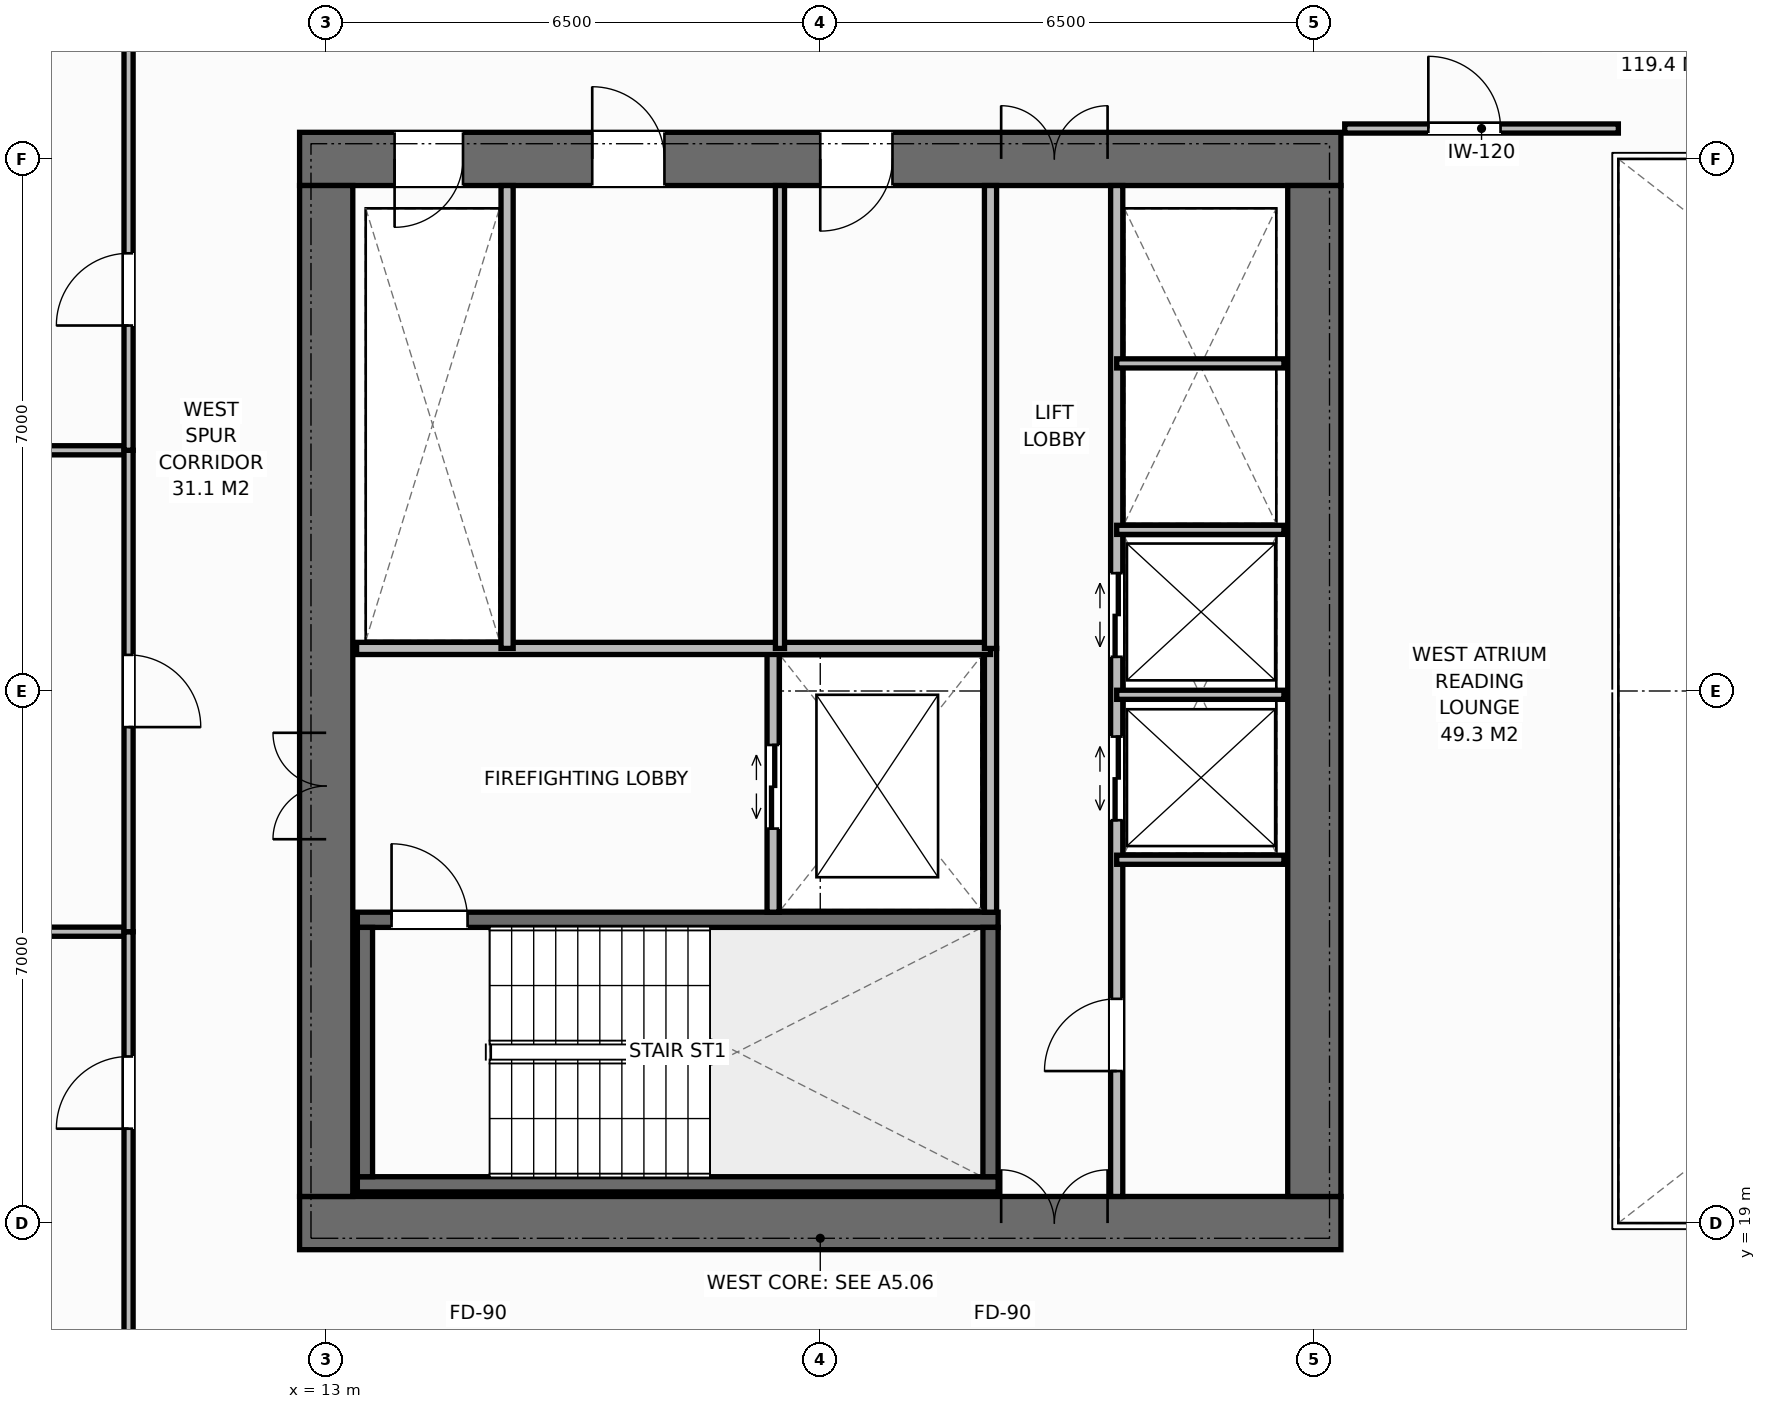
"""IFC4 building model, lengths in metres.
Left out: names, types, materials, properties, quantities, classifications, styles, units other than length and angle.
Written with IfcOpenShell. Run it as: python <this file> out.ifc"""

import sys

from ifc_helpers import new_model, si_unit, direction, frame, frame_2d, origin, place, context, subcontext, project, spatial, rectangle, extrude, element, fill, save


model = new_model("IFC4")
c1 = context("Model", 3, precision=1e-05, world=origin(), true_north=direction((0.0, 1.0)))
c2 = subcontext(c1, "Body", "Model", "MODEL_VIEW")
j1 = project(units=[si_unit("LENGTHUNIT", "METRE"), si_unit("PLANEANGLEUNIT", "RADIAN")], contexts=[c1])
p1 = place(None, origin())
s1 = spatial("IfcSite", under=j1, at=p1, CompositionType="ELEMENT")
p2 = place(p1, origin())
s2 = spatial("IfcBuilding", under=s1, at=p2, CompositionType="ELEMENT")
p3 = place(p2, frame((0.0, 0.0, 120.2)))
s3 = spatial("IfcBuildingStorey", under=s2, at=p3, CompositionType="ELEMENT", Elevation=120.2)
p4 = place(p3, frame((12.65, 19.0, 0.0), z_axis=(0.0, 0.0, 1.0), x_axis=(1.0, 0.0, 0.0)))
e1 = element("IfcWall", 1, at=p4, inside=s3, PredefinedType="SHEAR", context=c2, shape_type="SweptSolid", body=[
    extrude(rectangle(XDim=13.7, YDim=0.7, at=frame_2d((6.85, 0.0))), origin(), (0.0, 0.0, 1.0), 3.8),
])
p5 = place(p4, frame((9.23, 0.0, 0.0)))
e2 = element("IfcOpeningElement", 2, at=p5, cuts=e1, PredefinedType="OPENING", context=c2, shape_type="SweptSolid", body=[
    extrude(rectangle(XDim=1.4, YDim=2.2, at=frame_2d((0.7, 1.1))), frame((0.0, 0.36, 0.0), z_axis=(0.0, -1.0, 0.0), x_axis=(1.0, 0.0, 0.0)), (0.0, 0.0, 1.0), 0.72),
])
p6 = place(p3, frame((12.65, 33.0, 0.0), z_axis=(0.0, 0.0, 1.0), x_axis=(1.0, 0.0, 0.0)))
e3 = element("IfcWall", 3, at=p6, inside=s3, PredefinedType="SHEAR", context=c2, shape_type="SweptSolid", body=[
    extrude(rectangle(XDim=13.7, YDim=0.7, at=frame_2d((6.85, 0.0))), origin(), (0.0, 0.0, 1.0), 3.8),
])
p7 = place(p6, frame((1.25, 0.0, 0.0)))
e4 = element("IfcOpeningElement", 4, at=p7, cuts=e3, PredefinedType="OPENING", context=c2, shape_type="SweptSolid", body=[
    extrude(rectangle(XDim=0.9, YDim=2.15, at=frame_2d((0.45, 1.075))), frame((0.0, 0.36, 0.0), z_axis=(0.0, -1.0, 0.0), x_axis=(1.0, 0.0, 0.0)), (0.0, 0.0, 1.0), 0.72),
])
p8 = place(p6, frame((3.85, 0.0, 0.0)))
e5 = element("IfcOpeningElement", 5, at=p8, cuts=e3, PredefinedType="OPENING", context=c2, shape_type="SweptSolid", body=[
    extrude(rectangle(XDim=0.95, YDim=2.15, at=frame_2d((0.475, 1.075))), frame((0.0, 0.36, 0.0), z_axis=(0.0, -1.0, 0.0), x_axis=(1.0, 0.0, 0.0)), (0.0, 0.0, 1.0), 0.72),
])
p9 = place(p6, frame((6.85, 0.0, 0.0)))
e6 = element("IfcOpeningElement", 6, at=p9, cuts=e3, PredefinedType="OPENING", context=c2, shape_type="SweptSolid", body=[
    extrude(rectangle(XDim=0.95, YDim=2.15, at=frame_2d((0.475, 1.075))), frame((0.0, 0.36, 0.0), z_axis=(0.0, -1.0, 0.0), x_axis=(1.0, 0.0, 0.0)), (0.0, 0.0, 1.0), 0.72),
])
p10 = place(p6, frame((9.23, 0.0, 0.0)))
e7 = element("IfcOpeningElement", 7, at=p10, cuts=e3, PredefinedType="OPENING", context=c2, shape_type="SweptSolid", body=[
    extrude(rectangle(XDim=1.4, YDim=2.2, at=frame_2d((0.7, 1.1))), frame((0.0, 0.36, 0.0), z_axis=(0.0, -1.0, 0.0), x_axis=(1.0, 0.0, 0.0)), (0.0, 0.0, 1.0), 0.72),
])
p11 = place(p3, frame((13.0, 19.35, 0.0), z_axis=(0.0, 0.0, 1.0), x_axis=(0.0, 1.0, 0.0)))
e8 = element("IfcWall", 8, at=p11, inside=s3, PredefinedType="SHEAR", context=c2, shape_type="SweptSolid", body=[
    extrude(rectangle(XDim=13.3, YDim=0.7, at=frame_2d((6.65, 0.0))), origin(), (0.0, 0.0, 1.0), 3.8),
])
p12 = place(p11, frame((4.7, 0.0, 0.0)))
e9 = element("IfcOpeningElement", 9, at=p12, cuts=e8, PredefinedType="OPENING", context=c2, shape_type="SweptSolid", body=[
    extrude(rectangle(XDim=1.4, YDim=2.2, at=frame_2d((0.7, 1.1))), frame((0.0, 0.36, 0.0), z_axis=(0.0, -1.0, 0.0), x_axis=(1.0, 0.0, 0.0)), (0.0, 0.0, 1.0), 0.72),
])
p13 = place(p3, frame((26.0, 19.35, 0.0), z_axis=(0.0, 0.0, 1.0), x_axis=(0.0, 1.0, 0.0)))
e10 = element("IfcWall", 10, at=p13, inside=s3, PredefinedType="SHEAR", context=c2, shape_type="SweptSolid", body=[
    extrude(rectangle(XDim=13.3, YDim=0.7, at=frame_2d((6.65, 0.0))), origin(), (0.0, 0.0, 1.0), 3.8),
])
p14 = place(p3, frame((13.41, 19.51, 0.0), z_axis=(0.0, 0.0, 1.0), x_axis=(1.0, 0.0, 0.0)))
e11 = element("IfcWall", 11, at=p14, inside=s3, PredefinedType="SHEAR", context=c2, shape_type="SweptSolid", body=[
    extrude(rectangle(XDim=8.43, YDim=0.2, at=frame_2d((4.215, 0.0))), origin(), (0.0, 0.0, 1.0), 3.8),
])
p15 = place(p3, frame((13.41, 22.99, 0.0), z_axis=(0.0, 0.0, 1.0), x_axis=(1.0, 0.0, 0.0)))
e12 = element("IfcWall", 12, at=p15, inside=s3, PredefinedType="SHEAR", context=c2, shape_type="SweptSolid", body=[
    extrude(rectangle(XDim=8.43, YDim=0.2, at=frame_2d((4.215, 0.0))), origin(), (0.0, 0.0, 1.0), 3.8),
])
p16 = place(p15, frame((0.45, 0.0, 0.0)))
e13 = element("IfcOpeningElement", 13, at=p16, cuts=e12, PredefinedType="OPENING", context=c2, shape_type="SweptSolid", body=[
    extrude(rectangle(XDim=1.0, YDim=2.15, at=frame_2d((0.5, 1.075))), frame((0.0, 0.11, 0.0), z_axis=(0.0, -1.0, 0.0), x_axis=(1.0, 0.0, 0.0)), (0.0, 0.0, 1.0), 0.22),
])
for number, where, z_axis, x_axis in (
    (14, (13.51, 19.61, 0.0), (0.0, 0.0, 1.0), (0.0, 1.0, 0.0)),
    (15, (21.74, 19.61, 0.0), (0.0, 0.0, 1.0), (0.0, 1.0, 0.0)),
):
    element("IfcWall", number, at=place(p3, frame(where, z_axis=z_axis, x_axis=x_axis)), inside=s3, PredefinedType="SHEAR", context=c2, shape_type="SweptSolid", body=[
        extrude(rectangle(XDim=3.28, YDim=0.2, at=frame_2d((1.64, 0.0))), origin(), (0.0, 0.0, 1.0), 3.8),
    ])
p17 = place(p3, frame((21.74, 23.09, 0.0), z_axis=(0.0, 0.0, 1.0), x_axis=(0.0, 1.0, 0.0)))
e16 = element("IfcWall", 16, at=p17, inside=s3, PredefinedType="STANDARD", context=c2, shape_type="SweptSolid", body=[
    extrude(rectangle(XDim=3.47, YDim=0.16, at=frame_2d((1.735, 0.0))), origin(), (0.0, 0.0, 1.0), 3.565),
])
p18 = place(p3, frame((18.88, 23.09, 0.0), z_axis=(0.0, 0.0, 1.0), x_axis=(0.0, 1.0, 0.0)))
e17 = element("IfcWall", 17, at=p18, inside=s3, PredefinedType="STANDARD", context=c2, shape_type="SweptSolid", body=[
    extrude(rectangle(XDim=3.47, YDim=0.16, at=frame_2d((1.735, 0.0))), origin(), (0.0, 0.0, 1.0), 3.565),
])
p19 = place(p18, frame((1.1, 0.0, 0.0)))
e18 = element("IfcOpeningElement", 18, at=p19, cuts=e17, PredefinedType="OPENING", context=c2, shape_type="SweptSolid", body=[
    extrude(rectangle(XDim=1.1, YDim=2.2, at=frame_2d((0.55, 1.1))), frame((0.0, 0.09, 0.0), z_axis=(0.0, -1.0, 0.0), x_axis=(1.0, 0.0, 0.0)), (0.0, 0.0, 1.0), 0.18),
])
p20 = place(p3, frame((13.4, 26.56, 0.0), z_axis=(0.0, 0.0, 1.0), x_axis=(1.0, 0.0, 0.0)))
e19 = element("IfcWall", 19, at=p20, inside=s3, PredefinedType="STANDARD", context=c2, shape_type="SweptSolid", body=[
    extrude(rectangle(XDim=8.34, YDim=0.16, at=frame_2d((4.17, 0.0))), origin(), (0.0, 0.0, 1.0), 3.565),
])
p21 = place(p3, frame((15.38, 26.56, 0.0), z_axis=(0.0, 0.0, 1.0), x_axis=(0.0, 1.0, 0.0)))
e20 = element("IfcWall", 20, at=p21, inside=s3, PredefinedType="STANDARD", context=c2, shape_type="SweptSolid", body=[
    extrude(rectangle(XDim=6.09, YDim=0.16, at=frame_2d((3.045, 0.0))), origin(), (0.0, 0.0, 1.0), 3.565),
])
p22 = place(p3, frame((18.97, 26.56, 0.0), z_axis=(0.0, 0.0, 1.0), x_axis=(0.0, 1.0, 0.0)))
e21 = element("IfcWall", 21, at=p22, inside=s3, PredefinedType="PARTITIONING", context=c2, shape_type="SweptSolid", body=[
    extrude(rectangle(XDim=6.09, YDim=0.12, at=frame_2d((3.045, 0.0))), origin(), (0.0, 0.0, 1.0), 3.565),
])
p23 = place(p3, frame((21.74, 26.56, 0.0), z_axis=(0.0, 0.0, 1.0), x_axis=(0.0, 1.0, 0.0)))
e22 = element("IfcWall", 22, at=p23, inside=s3, PredefinedType="STANDARD", context=c2, shape_type="SweptSolid", body=[
    extrude(rectangle(XDim=6.09, YDim=0.16, at=frame_2d((3.045, 0.0))), origin(), (0.0, 0.0, 1.0), 3.565),
])
p24 = place(p3, frame((23.4, 19.35, 0.0), z_axis=(0.0, 0.0, 1.0), x_axis=(0.0, 1.0, 0.0)))
e23 = element("IfcWall", 23, at=p24, inside=s3, PredefinedType="STANDARD", context=c2, shape_type="SweptSolid", body=[
    extrude(rectangle(XDim=13.3, YDim=0.16, at=frame_2d((6.65, 0.0))), origin(), (0.0, 0.0, 1.0), 3.565),
])
p25 = place(p24, frame((1.65, 0.0, 0.0)))
e24 = element("IfcOpeningElement", 24, at=p25, cuts=e23, PredefinedType="OPENING", context=c2, shape_type="SweptSolid", body=[
    extrude(rectangle(XDim=0.95, YDim=2.15, at=frame_2d((0.475, 1.075))), frame((0.0, 0.09, 0.0), z_axis=(0.0, -1.0, 0.0), x_axis=(1.0, 0.0, 0.0)), (0.0, 0.0, 1.0), 0.18),
])
p26 = place(p24, frame((4.95, 0.0, 0.0)))
e25 = element("IfcOpeningElement", 25, at=p26, cuts=e23, PredefinedType="OPENING", context=c2, shape_type="SweptSolid", body=[
    extrude(rectangle(XDim=1.1, YDim=2.2, at=frame_2d((0.55, 1.1))), frame((0.0, 0.09, 0.0), z_axis=(0.0, -1.0, 0.0), x_axis=(1.0, 0.0, 0.0)), (0.0, 0.0, 1.0), 0.18),
])
p27 = place(p24, frame((7.1, 0.0, 0.0)))
e26 = element("IfcOpeningElement", 26, at=p27, cuts=e23, PredefinedType="OPENING", context=c2, shape_type="SweptSolid", body=[
    extrude(rectangle(XDim=1.1, YDim=2.2, at=frame_2d((0.55, 1.1))), frame((0.0, 0.09, 0.0), z_axis=(0.0, -1.0, 0.0), x_axis=(1.0, 0.0, 0.0)), (0.0, 0.0, 1.0), 0.18),
])
for number, where, z_axis, x_axis in (
    (27, (23.4, 23.78, 0.0), (0.0, 0.0, 1.0), (1.0, 0.0, 0.0)),
    (28, (23.4, 25.95, 0.0), (0.0, 0.0, 1.0), (1.0, 0.0, 0.0)),
    (29, (23.4, 28.12, 0.0), (0.0, 0.0, 1.0), (1.0, 0.0, 0.0)),
    (30, (23.4, 30.31, 0.0), (0.0, 0.0, 1.0), (1.0, 0.0, 0.0)),
):
    element("IfcWall", number, at=place(p3, frame(where, z_axis=z_axis, x_axis=x_axis)), inside=s3, PredefinedType="PARTITIONING", context=c2, shape_type="SweptSolid", body=[
        extrude(rectangle(XDim=2.2, YDim=0.12, at=frame_2d((1.1, 0.0))), origin(), (0.0, 0.0, 1.0), 3.565),
    ])
p28 = place(p3, frame((26.4, 33.4, 0.0), z_axis=(0.0, 0.0, 1.0), x_axis=(1.0, 0.0, 0.0)))
e31 = element("IfcWall", 31, at=p28, inside=s3, PredefinedType="PARTITIONING", context=c2, shape_type="SweptSolid", body=[
    extrude(rectangle(XDim=3.6, YDim=0.12, at=frame_2d((1.8, 0.0))), origin(), (0.0, 0.0, 1.0), 3.565),
])
p29 = place(p28, frame((1.1, 0.0, 0.0)))
e32 = element("IfcOpeningElement", 32, at=p29, cuts=e31, PredefinedType="OPENING", context=c2, shape_type="SweptSolid", body=[
    extrude(rectangle(XDim=0.95, YDim=2.15, at=frame_2d((0.475, 1.075))), frame((0.0, 0.07, 0.0), z_axis=(0.0, -1.0, 0.0), x_axis=(1.0, 0.0, 0.0)), (0.0, 0.0, 1.0), 0.14),
])
p30 = place(p3, frame((1.82, 22.833, 0.0), z_axis=(0.0, 0.0, 1.0), x_axis=(1.0, 0.0, 0.0)))
e33 = element("IfcWall", 33, at=p30, inside=s3, PredefinedType="PARTITIONING", context=c2, shape_type="SweptSolid", body=[
    extrude(rectangle(XDim=8.58, YDim=0.12, at=frame_2d((4.29, 0.0))), origin(), (0.0, 0.0, 1.0), 3.565),
])
p31 = place(p3, frame((10.4, 16.5, 0.0), z_axis=(0.0, 0.0, 1.0), x_axis=(0.0, 1.0, 0.0)))
e34 = element("IfcWall", 34, at=p31, inside=s3, PredefinedType="PARTITIONING", context=c2, shape_type="SweptSolid", body=[
    extrude(rectangle(XDim=6.333, YDim=0.12, at=frame_2d((3.167, 0.0))), origin(), (0.0, 0.0, 1.0), 3.565),
])
p32 = place(p31, frame((3.742, 0.0, 0.0)))
e35 = element("IfcOpeningElement", 35, at=p32, cuts=e34, PredefinedType="OPENING", context=c2, shape_type="SweptSolid", body=[
    extrude(rectangle(XDim=0.95, YDim=2.15, at=frame_2d((0.475, 1.075))), frame((0.0, 0.07, 0.0), z_axis=(0.0, -1.0, 0.0), x_axis=(1.0, 0.0, 0.0)), (0.0, 0.0, 1.0), 0.14),
])
p33 = place(p3, frame((1.82, 29.167, 0.0), z_axis=(0.0, 0.0, 1.0), x_axis=(1.0, 0.0, 0.0)))
e36 = element("IfcWall", 36, at=p33, inside=s3, PredefinedType="PARTITIONING", context=c2, shape_type="SweptSolid", body=[
    extrude(rectangle(XDim=8.58, YDim=0.12, at=frame_2d((4.29, 0.0))), origin(), (0.0, 0.0, 1.0), 3.565),
])
p34 = place(p3, frame((10.4, 22.833, 0.0), z_axis=(0.0, 0.0, 1.0), x_axis=(0.0, 1.0, 0.0)))
e37 = element("IfcWall", 37, at=p34, inside=s3, PredefinedType="PARTITIONING", context=c2, shape_type="SweptSolid", body=[
    extrude(rectangle(XDim=6.333, YDim=0.12, at=frame_2d((3.167, 0.0))), origin(), (0.0, 0.0, 1.0), 3.565),
])
p35 = place(p34, frame((2.692, 0.0, 0.0)))
e38 = element("IfcOpeningElement", 38, at=p35, cuts=e37, PredefinedType="OPENING", context=c2, shape_type="SweptSolid", body=[
    extrude(rectangle(XDim=0.95, YDim=2.15, at=frame_2d((0.475, 1.075))), frame((0.0, 0.07, 0.0), z_axis=(0.0, -1.0, 0.0), x_axis=(1.0, 0.0, 0.0)), (0.0, 0.0, 1.0), 0.14),
])
p36 = place(p3, frame((10.4, 29.167, 0.0), z_axis=(0.0, 0.0, 1.0), x_axis=(0.0, 1.0, 0.0)))
e39 = element("IfcWall", 39, at=p36, inside=s3, PredefinedType="PARTITIONING", context=c2, shape_type="SweptSolid", body=[
    extrude(rectangle(XDim=6.333, YDim=0.12, at=frame_2d((3.167, 0.0))), origin(), (0.0, 0.0, 1.0), 3.565),
])
p37 = place(p36, frame((1.642, 0.0, 0.0)))
e40 = element("IfcOpeningElement", 40, at=p37, cuts=e39, PredefinedType="OPENING", context=c2, shape_type="SweptSolid", body=[
    extrude(rectangle(XDim=0.95, YDim=2.15, at=frame_2d((0.475, 1.075))), frame((0.0, 0.07, 0.0), z_axis=(0.0, -1.0, 0.0), x_axis=(1.0, 0.0, 0.0)), (0.0, 0.0, 1.0), 0.14),
])
p38 = place(p16, origin())
e41 = element("IfcDoor", 41, at=p38, inside=s3, OperationType="SINGLE_SWING_LEFT", PredefinedType="DOOR", context=c2, shape_type="SweptSolid", body=[
    extrude(rectangle(XDim=1.0, YDim=2.15, at=frame_2d((0.5, 1.075))), frame((0.0, 0.025, 0.0), z_axis=(0.0, -1.0, 0.0), x_axis=(1.0, 0.0, 0.0)), (0.0, 0.0, 1.0), 0.05),
])
fill(e13, e41)
p39 = place(p12, origin())
e42 = element("IfcDoor", 42, at=p39, inside=s3, OperationType="DOUBLE_DOOR_SINGLE_SWING", PredefinedType="DOOR", context=c2, shape_type="SweptSolid", body=[
    extrude(rectangle(XDim=1.4, YDim=2.2, at=frame_2d((0.7, 1.1))), frame((0.0, 0.025, 0.0), z_axis=(0.0, -1.0, 0.0), x_axis=(1.0, 0.0, 0.0)), (0.0, 0.0, 1.0), 0.05),
])
fill(e9, e42)
p40 = place(p19, origin())
e43 = element("IfcDoor", 43, at=p40, inside=s3, OperationType="DOUBLE_DOOR_SLIDING", PredefinedType="DOOR", context=c2, shape_type="SweptSolid", body=[
    extrude(rectangle(XDim=1.1, YDim=2.2, at=frame_2d((0.55, 1.1))), frame((0.0, 0.025, 0.0), z_axis=(0.0, -1.0, 0.0), x_axis=(1.0, 0.0, 0.0)), (0.0, 0.0, 1.0), 0.05),
])
fill(e18, e43)
p41 = place(p7, origin())
e44 = element("IfcDoor", 44, at=p41, inside=s3, OperationType="SINGLE_SWING_RIGHT", PredefinedType="DOOR", context=c2, shape_type="SweptSolid", body=[
    extrude(rectangle(XDim=0.9, YDim=2.15, at=frame_2d((0.45, 1.075))), frame((0.0, -0.075, 0.0), z_axis=(0.0, -1.0, 0.0), x_axis=(1.0, 0.0, 0.0)), (0.0, 0.0, 1.0), 0.05),
])
fill(e4, e44)
p42 = place(p8, origin())
e45 = element("IfcDoor", 45, at=p42, inside=s3, OperationType="SINGLE_SWING_LEFT", PredefinedType="DOOR", context=c2, shape_type="SweptSolid", body=[
    extrude(rectangle(XDim=0.95, YDim=2.15, at=frame_2d((0.475, 1.075))), frame((0.0, -0.075, 0.0), z_axis=(0.0, -1.0, 0.0), x_axis=(1.0, 0.0, 0.0)), (0.0, 0.0, 1.0), 0.05),
])
fill(e5, e45)
p43 = place(p9, origin())
e46 = element("IfcDoor", 46, at=p43, inside=s3, OperationType="SINGLE_SWING_RIGHT", PredefinedType="DOOR", context=c2, shape_type="SweptSolid", body=[
    extrude(rectangle(XDim=0.95, YDim=2.15, at=frame_2d((0.475, 1.075))), frame((0.0, -0.075, 0.0), z_axis=(0.0, -1.0, 0.0), x_axis=(1.0, 0.0, 0.0)), (0.0, 0.0, 1.0), 0.05),
])
fill(e6, e46)
p44 = place(p5, origin())
e47 = element("IfcDoor", 47, at=p44, inside=s3, OperationType="DOUBLE_DOOR_SINGLE_SWING", PredefinedType="DOOR", context=c2, shape_type="SweptSolid", body=[
    extrude(rectangle(XDim=1.4, YDim=2.2, at=frame_2d((0.7, 1.1))), frame((0.0, 0.125, 0.0), z_axis=(0.0, -1.0, 0.0), x_axis=(1.0, 0.0, 0.0)), (0.0, 0.0, 1.0), 0.05),
])
fill(e2, e47)
p45 = place(p10, origin())
e48 = element("IfcDoor", 48, at=p45, inside=s3, OperationType="DOUBLE_DOOR_SINGLE_SWING", PredefinedType="DOOR", context=c2, shape_type="SweptSolid", body=[
    extrude(rectangle(XDim=1.4, YDim=2.2, at=frame_2d((0.7, 1.1))), frame((0.0, -0.075, 0.0), z_axis=(0.0, -1.0, 0.0), x_axis=(1.0, 0.0, 0.0)), (0.0, 0.0, 1.0), 0.05),
])
fill(e7, e48)
p46 = place(p25, origin())
e49 = element("IfcDoor", 49, at=p46, inside=s3, OperationType="SINGLE_SWING_LEFT", PredefinedType="DOOR", context=c2, shape_type="SweptSolid", body=[
    extrude(rectangle(XDim=0.95, YDim=2.15, at=frame_2d((0.475, 1.075))), frame((0.0, 0.025, 0.0), z_axis=(0.0, -1.0, 0.0), x_axis=(1.0, 0.0, 0.0)), (0.0, 0.0, 1.0), 0.05),
])
fill(e24, e49)
p47 = place(p26, origin())
e50 = element("IfcDoor", 50, at=p47, inside=s3, OperationType="DOUBLE_DOOR_SLIDING", PredefinedType="DOOR", context=c2, shape_type="SweptSolid", body=[
    extrude(rectangle(XDim=1.1, YDim=2.2, at=frame_2d((0.55, 1.1))), frame((0.0, 0.025, 0.0), z_axis=(0.0, -1.0, 0.0), x_axis=(1.0, 0.0, 0.0)), (0.0, 0.0, 1.0), 0.05),
])
fill(e25, e50)
p48 = place(p27, origin())
e51 = element("IfcDoor", 51, at=p48, inside=s3, OperationType="DOUBLE_DOOR_SLIDING", PredefinedType="DOOR", context=c2, shape_type="SweptSolid", body=[
    extrude(rectangle(XDim=1.1, YDim=2.2, at=frame_2d((0.55, 1.1))), frame((0.0, 0.025, 0.0), z_axis=(0.0, -1.0, 0.0), x_axis=(1.0, 0.0, 0.0)), (0.0, 0.0, 1.0), 0.05),
])
fill(e26, e51)
p49 = place(p29, origin())
e52 = element("IfcDoor", 52, at=p49, inside=s3, OperationType="SINGLE_SWING_LEFT", PredefinedType="DOOR", context=c2, shape_type="SweptSolid", body=[
    extrude(rectangle(XDim=0.95, YDim=2.15, at=frame_2d((0.475, 1.075))), frame((0.0, 0.025, 0.0), z_axis=(0.0, -1.0, 0.0), x_axis=(1.0, 0.0, 0.0)), (0.0, 0.0, 1.0), 0.05),
])
fill(e32, e52)
p50 = place(p32, origin())
e53 = element("IfcDoor", 53, at=p50, inside=s3, OperationType="SINGLE_SWING_LEFT", PredefinedType="DOOR", context=c2, shape_type="SweptSolid", body=[
    extrude(rectangle(XDim=0.95, YDim=2.15, at=frame_2d((0.475, 1.075))), frame((0.0, 0.025, 0.0), z_axis=(0.0, -1.0, 0.0), x_axis=(1.0, 0.0, 0.0)), (0.0, 0.0, 1.0), 0.05),
])
fill(e35, e53)
p51 = place(p35, origin())
e54 = element("IfcDoor", 54, at=p51, inside=s3, OperationType="SINGLE_SWING_RIGHT", PredefinedType="DOOR", context=c2, shape_type="SweptSolid", body=[
    extrude(rectangle(XDim=0.95, YDim=2.15, at=frame_2d((0.475, 1.075))), frame((0.0, 0.025, 0.0), z_axis=(0.0, -1.0, 0.0), x_axis=(1.0, 0.0, 0.0)), (0.0, 0.0, 1.0), 0.05),
])
fill(e38, e54)
p52 = place(p37, origin())
e55 = element("IfcDoor", 55, at=p52, inside=s3, OperationType="SINGLE_SWING_LEFT", PredefinedType="DOOR", context=c2, shape_type="SweptSolid", body=[
    extrude(rectangle(XDim=0.95, YDim=2.15, at=frame_2d((0.475, 1.075))), frame((0.0, 0.025, 0.0), z_axis=(0.0, -1.0, 0.0), x_axis=(1.0, 0.0, 0.0)), (0.0, 0.0, 1.0), 0.05),
])
fill(e40, e55)
save(model, sys.argv[1])
